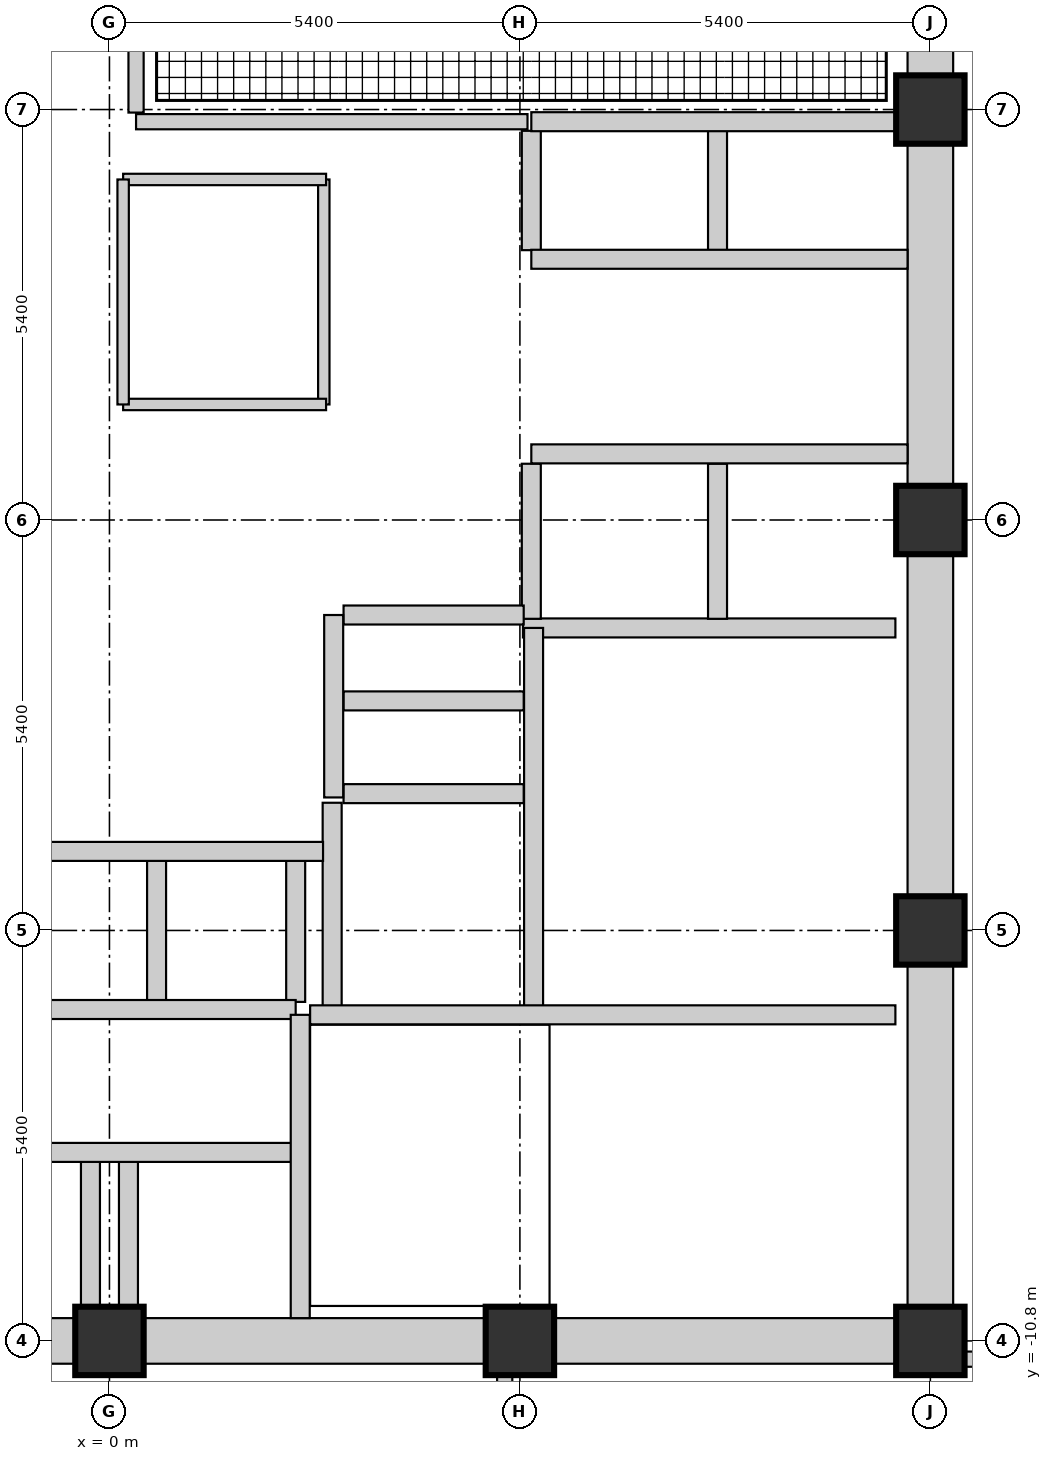
"""IFC4 building model, lengths in metres.
Left out: names, types, materials, properties, quantities, classifications, styles, units other than length and angle.
Written with IfcOpenShell. Run it as: python <this file> out.ifc"""

import sys

from ifc_helpers import new_model, si_unit, direction, frame, frame_2d, origin, origin_2d, place, context, subcontext, project, spatial, rectangle, extrude, element, fill, save


model = new_model("IFC4")
c1 = context("Model", 3, precision=1e-05, world=origin(), true_north=direction((0.0, 1.0)))
c2 = subcontext(c1, "Body", "Model", "MODEL_VIEW")
j1 = project(units=[si_unit("LENGTHUNIT", "METRE"), si_unit("PLANEANGLEUNIT", "RADIAN")], contexts=[c1])
p1 = place(None, origin())
s1 = spatial("IfcSite", under=j1, at=p1, CompositionType="ELEMENT")
p2 = place(p1, origin())
s2 = spatial("IfcBuilding", under=s1, at=p2, CompositionType="ELEMENT")
p3 = place(p2, frame((0.0, 0.0, 174.75)))
s3 = spatial("IfcBuildingStorey", under=s2, at=p3, CompositionType="ELEMENT", Elevation=174.75)
for number, where, z_axis, x_axis in (
    (1, (0.0, -10.8, 0.0), (0.0, 0.0, 1.0), (1.0, 0.0, 0.0)),
    (2, (5.4, -10.8, 0.0), (0.0, 0.0, 1.0), (1.0, 0.0, 0.0)),
    (3, (10.8, -10.8, 0.0), (0.0, 0.0, 1.0), (1.0, 0.0, 0.0)),
    (4, (10.8, -5.4, 0.0), (0.0, 0.0, 1.0), (1.0, 0.0, 0.0)),
    (5, (10.8, 0.0, 0.0), (0.0, 0.0, 1.0), (1.0, 0.0, 0.0)),
    (6, (10.8, 5.4, 0.0), (0.0, 0.0, 1.0), (1.0, 0.0, 0.0)),
):
    element("IfcColumn", number, at=place(p3, frame(where, z_axis=z_axis, x_axis=x_axis)), inside=s3, PredefinedType="COLUMN", context=c2, shape_type="SweptSolid", body=[
        extrude(rectangle(XDim=0.9, YDim=0.9, at=origin_2d()), origin(), (0.0, 0.0, 1.0), 3.75),
    ])
for number, where, z_axis, x_axis in (
    (7, (10.8, -10.34, 0.0), (0.0, 0.0, 1.0), (0.0, 1.0, 0.0)),
    (8, (-4.94, -10.8, 0.0), (0.0, 0.0, 1.0), (1.0, 0.0, 0.0)),
):
    element("IfcWall", number, at=place(p3, frame(where, z_axis=z_axis, x_axis=x_axis)), inside=s3, PredefinedType="SHEAR", context=c2, shape_type="SweptSolid", body=[
        extrude(rectangle(XDim=4.48, YDim=0.6, at=frame_2d((2.24, 0.0))), origin(), (0.0, 0.0, 1.0), 3.75),
    ])
p4 = place(p3, frame((10.8, -4.94, 0.0), z_axis=(0.0, 0.0, 1.0), x_axis=(0.0, 1.0, 0.0)))
e9 = element("IfcWall", 9, at=p4, inside=s3, PredefinedType="SHEAR", context=c2, shape_type="SweptSolid", body=[
    extrude(rectangle(XDim=4.48, YDim=0.6, at=frame_2d((2.24, 0.0))), origin(), (0.0, 0.0, 1.0), 3.75),
])
p5 = place(p4, frame((1.69, 0.0, 0.0)))
e10 = element("IfcOpeningElement", 10, at=p5, cuts=e9, PredefinedType="OPENING", context=c2, shape_type="SweptSolid", body=[
    extrude(rectangle(XDim=1.1, YDim=2.1, at=frame_2d((0.55, 1.05))), frame((0.0, 0.31, 0.0), z_axis=(0.0, -1.0, 0.0), x_axis=(1.0, 0.0, 0.0)), (0.0, 0.0, 1.0), 0.62),
])
p6 = place(p3, frame((0.46, -10.8, 0.0), z_axis=(0.0, 0.0, 1.0), x_axis=(1.0, 0.0, 0.0)))
e11 = element("IfcWall", 11, at=p6, inside=s3, PredefinedType="SHEAR", context=c2, shape_type="SweptSolid", body=[
    extrude(rectangle(XDim=4.48, YDim=0.6, at=frame_2d((2.24, 0.0))), origin(), (0.0, 0.0, 1.0), 3.75),
])
p7 = place(p3, frame((10.8, 0.46, 0.0), z_axis=(0.0, 0.0, 1.0), x_axis=(0.0, 1.0, 0.0)))
e12 = element("IfcWall", 12, at=p7, inside=s3, PredefinedType="SHEAR", context=c2, shape_type="SweptSolid", body=[
    extrude(rectangle(XDim=4.48, YDim=0.6, at=frame_2d((2.24, 0.0))), origin(), (0.0, 0.0, 1.0), 3.75),
])
p8 = place(p7, frame((1.69, 0.0, 0.0)))
e13 = element("IfcOpeningElement", 13, at=p8, cuts=e12, PredefinedType="OPENING", context=c2, shape_type="SweptSolid", body=[
    extrude(rectangle(XDim=1.1, YDim=2.1, at=frame_2d((0.55, 1.05))), frame((0.0, 0.31, 0.0), z_axis=(0.0, -1.0, 0.0), x_axis=(1.0, 0.0, 0.0)), (0.0, 0.0, 1.0), 0.62),
])
for number, where, z_axis, x_axis in (
    (14, (5.86, -10.8, 0.0), (0.0, 0.0, 1.0), (1.0, 0.0, 0.0)),
    (15, (10.8, 5.86, 0.0), (0.0, 0.0, 1.0), (0.0, 1.0, 0.0)),
):
    element("IfcWall", number, at=place(p3, frame(where, z_axis=z_axis, x_axis=x_axis)), inside=s3, PredefinedType="SHEAR", context=c2, shape_type="SweptSolid", body=[
        extrude(rectangle(XDim=4.48, YDim=0.6, at=frame_2d((2.24, 0.0))), origin(), (0.0, 0.0, 1.0), 3.75),
    ])
p9 = place(p3, frame((2.93, -6.51, 0.0), z_axis=(0.0, 0.0, 1.0), x_axis=(0.0, 1.0, 0.0)))
e16 = element("IfcWall", 16, at=p9, inside=s3, PredefinedType="SHEAR", context=c2, shape_type="SweptSolid", body=[
    extrude(rectangle(XDim=2.79, YDim=0.25, at=frame_2d((1.395, 0.0))), origin(), (0.0, 0.0, 1.0), 3.75),
])
p10 = place(p3, frame((5.44, -1.42, 0.0), z_axis=(0.0, 0.0, 1.0), x_axis=(1.0, 0.0, 0.0)))
e17 = element("IfcWall", 17, at=p10, inside=s3, PredefinedType="SHEAR", context=c2, shape_type="SweptSolid", body=[
    extrude(rectangle(XDim=4.9, YDim=0.25, at=frame_2d((2.45, 0.0))), origin(), (0.0, 0.0, 1.0), 3.75),
])
p11 = place(p3, frame((3.08, -3.6, 0.0), z_axis=(0.0, 0.0, 1.0), x_axis=(1.0, 0.0, 0.0)))
e18 = element("IfcWall", 18, at=p11, inside=s3, PredefinedType="SHEAR", context=c2, shape_type="SweptSolid", body=[
    extrude(rectangle(XDim=2.37, YDim=0.25, at=frame_2d((1.185, 0.0))), origin(), (0.0, 0.0, 1.0), 3.75),
])
p12 = place(p3, frame((5.58, -6.51, 0.0), z_axis=(0.0, 0.0, 1.0), x_axis=(0.0, 1.0, 0.0)))
e19 = element("IfcWall", 19, at=p12, inside=s3, PredefinedType="SHEAR", context=c2, shape_type="SweptSolid", body=[
    extrude(rectangle(XDim=5.09, YDim=0.25, at=frame_2d((2.545, 0.0))), origin(), (0.0, 0.0, 1.0), 3.75),
])
p13 = place(p12, frame((0.85, 0.0, 0.0)))
e20 = element("IfcOpeningElement", 20, at=p13, cuts=e19, PredefinedType="OPENING", context=c2, shape_type="SweptSolid", body=[
    extrude(rectangle(XDim=1.1, YDim=2.1, at=frame_2d((0.55, 1.05))), frame((0.0, 0.135, 0.0), z_axis=(0.0, -1.0, 0.0), x_axis=(1.0, 0.0, 0.0)), (0.0, 0.0, 1.0), 0.27),
])
for number, where, z_axis, x_axis in (
    (21, (0.62, -6.34, 0.0), (0.0, 0.0, 1.0), (0.0, 1.0, 0.0)),
    (22, (2.45, -6.34, 0.0), (0.0, 0.0, 1.0), (0.0, 1.0, 0.0)),
):
    element("IfcWall", number, at=place(p3, frame(where, z_axis=z_axis, x_axis=x_axis)), inside=s3, PredefinedType="SHEAR", context=c2, shape_type="SweptSolid", body=[
        extrude(rectangle(XDim=1.88, YDim=0.25, at=frame_2d((0.94, 0.0))), origin(), (0.0, 0.0, 1.0), 3.75),
    ])
for number, where, z_axis, x_axis in (
    (23, (-0.25, -10.35, 0.0), (0.0, 0.0, 1.0), (0.0, 1.0, 0.0)),
    (24, (0.25, -10.35, 0.0), (0.0, 0.0, 1.0), (0.0, 1.0, 0.0)),
):
    element("IfcWall", number, at=place(p3, frame(where, z_axis=z_axis, x_axis=x_axis)), inside=s3, PredefinedType="SHEAR", context=c2, shape_type="SweptSolid", body=[
        extrude(rectangle(XDim=1.91, YDim=0.25, at=frame_2d((0.955, 0.0))), origin(), (0.0, 0.0, 1.0), 3.75),
    ])
p14 = place(p3, frame((-1.22, -6.44, 0.0), z_axis=(0.0, 0.0, 1.0), x_axis=(1.0, 0.0, 0.0)))
e25 = element("IfcWall", 25, at=p14, inside=s3, PredefinedType="SHEAR", context=c2, shape_type="SweptSolid", body=[
    extrude(rectangle(XDim=3.67, YDim=0.25, at=frame_2d((1.835, 0.0))), origin(), (0.0, 0.0, 1.0), 3.75),
])
p15 = place(p3, frame((-2.48, -8.32, 0.0), z_axis=(0.0, 0.0, 1.0), x_axis=(1.0, 0.0, 0.0)))
e26 = element("IfcWall", 26, at=p15, inside=s3, PredefinedType="SHEAR", context=c2, shape_type="SweptSolid", body=[
    extrude(rectangle(XDim=4.93, YDim=0.25, at=frame_2d((2.465, 0.0))), origin(), (0.0, 0.0, 1.0), 3.75),
])
p16 = place(p3, frame((-1.22, -4.36, 0.0), z_axis=(0.0, 0.0, 1.0), x_axis=(1.0, 0.0, 0.0)))
e27 = element("IfcWall", 27, at=p16, inside=s3, PredefinedType="SHEAR", context=c2, shape_type="SweptSolid", body=[
    extrude(rectangle(XDim=4.03, YDim=0.25, at=frame_2d((2.015, 0.0))), origin(), (0.0, 0.0, 1.0), 3.75),
])
for number, where, z_axis, x_axis in (
    (28, (5.55, 3.55, 0.0), (0.0, 0.0, 1.0), (0.0, 1.0, 0.0)),
    (29, (8.0, 3.55, 0.0), (0.0, 0.0, 1.0), (0.0, 1.0, 0.0)),
):
    element("IfcWall", number, at=place(p3, frame(where, z_axis=z_axis, x_axis=x_axis)), inside=s3, PredefinedType="SHEAR", context=c2, shape_type="SweptSolid", body=[
        extrude(rectangle(XDim=1.57, YDim=0.25, at=frame_2d((0.785, 0.0))), origin(), (0.0, 0.0, 1.0), 3.75),
    ])
for number, where, z_axis, x_axis in (
    (30, (5.55, -1.3, 0.0), (0.0, 0.0, 1.0), (0.0, 1.0, 0.0)),
    (31, (8.0, -1.3, 0.0), (0.0, 0.0, 1.0), (0.0, 1.0, 0.0)),
):
    element("IfcWall", number, at=place(p3, frame(where, z_axis=z_axis, x_axis=x_axis)), inside=s3, PredefinedType="SHEAR", context=c2, shape_type="SweptSolid", body=[
        extrude(rectangle(XDim=2.04, YDim=0.25, at=frame_2d((1.02, 0.0))), origin(), (0.0, 0.0, 1.0), 3.75),
    ])
p17 = place(p3, frame((5.55, 3.43, 0.0), z_axis=(0.0, 0.0, 1.0), x_axis=(1.0, 0.0, 0.0)))
e32 = element("IfcWall", 32, at=p17, inside=s3, PredefinedType="SHEAR", context=c2, shape_type="SweptSolid", body=[
    extrude(rectangle(XDim=4.95, YDim=0.25, at=frame_2d((2.475, 0.0))), origin(), (0.0, 0.0, 1.0), 3.75),
])
p18 = place(p17, frame((0.65, 0.0, 0.0)))
e33 = element("IfcOpeningElement", 33, at=p18, cuts=e32, PredefinedType="OPENING", context=c2, shape_type="SweptSolid", body=[
    extrude(rectangle(XDim=1.1, YDim=2.1, at=frame_2d((0.55, 1.05))), frame((0.0, 0.135, 0.0), z_axis=(0.0, -1.0, 0.0), x_axis=(1.0, 0.0, 0.0)), (0.0, 0.0, 1.0), 0.27),
])
p19 = place(p17, frame((3.05, 0.0, 0.0)))
e34 = element("IfcOpeningElement", 34, at=p19, cuts=e32, PredefinedType="OPENING", context=c2, shape_type="SweptSolid", body=[
    extrude(rectangle(XDim=1.1, YDim=2.1, at=frame_2d((0.55, 1.05))), frame((0.0, 0.135, 0.0), z_axis=(0.0, -1.0, 0.0), x_axis=(1.0, 0.0, 0.0)), (0.0, 0.0, 1.0), 0.27),
])
p20 = place(p3, frame((5.55, 5.24, 0.0), z_axis=(0.0, 0.0, 1.0), x_axis=(1.0, 0.0, 0.0)))
e35 = element("IfcWall", 35, at=p20, inside=s3, PredefinedType="SHEAR", context=c2, shape_type="SweptSolid", body=[
    extrude(rectangle(XDim=4.8, YDim=0.25, at=frame_2d((2.4, 0.0))), origin(), (0.0, 0.0, 1.0), 3.75),
])
p21 = place(p3, frame((5.55, 0.87, 0.0), z_axis=(0.0, 0.0, 1.0), x_axis=(1.0, 0.0, 0.0)))
e36 = element("IfcWall", 36, at=p21, inside=s3, PredefinedType="SHEAR", context=c2, shape_type="SweptSolid", body=[
    extrude(rectangle(XDim=4.95, YDim=0.25, at=frame_2d((2.475, 0.0))), origin(), (0.0, 0.0, 1.0), 3.75),
])
p22 = place(p21, frame((0.65, 0.0, 0.0)))
e37 = element("IfcOpeningElement", 37, at=p22, cuts=e36, PredefinedType="OPENING", context=c2, shape_type="SweptSolid", body=[
    extrude(rectangle(XDim=1.1, YDim=2.1, at=frame_2d((0.55, 1.05))), frame((0.0, 0.135, 0.0), z_axis=(0.0, -1.0, 0.0), x_axis=(1.0, 0.0, 0.0)), (0.0, 0.0, 1.0), 0.27),
])
p23 = place(p21, frame((3.05, 0.0, 0.0)))
e38 = element("IfcOpeningElement", 38, at=p23, cuts=e36, PredefinedType="OPENING", context=c2, shape_type="SweptSolid", body=[
    extrude(rectangle(XDim=1.1, YDim=2.1, at=frame_2d((0.55, 1.05))), frame((0.0, 0.135, 0.0), z_axis=(0.0, -1.0, 0.0), x_axis=(1.0, 0.0, 0.0)), (0.0, 0.0, 1.0), 0.27),
])
for number, where, z_axis, x_axis in (
    (39, (3.08, -2.38, 0.0), (0.0, 0.0, 1.0), (1.0, 0.0, 0.0)),
    (40, (3.08, -1.25, 0.0), (0.0, 0.0, 1.0), (1.0, 0.0, 0.0)),
):
    element("IfcWall", number, at=place(p3, frame(where, z_axis=z_axis, x_axis=x_axis)), inside=s3, PredefinedType="SHEAR", context=c2, shape_type="SweptSolid", body=[
        extrude(rectangle(XDim=2.37, YDim=0.25, at=frame_2d((1.185, 0.0))), origin(), (0.0, 0.0, 1.0), 3.75),
    ])
p24 = place(p3, frame((2.95, -3.65, 0.0), z_axis=(0.0, 0.0, 1.0), x_axis=(0.0, 1.0, 0.0)))
e41 = element("IfcWall", 41, at=p24, inside=s3, PredefinedType="SHEAR", context=c2, shape_type="SweptSolid", body=[
    extrude(rectangle(XDim=2.4, YDim=0.25, at=frame_2d((1.2, 0.0))), origin(), (0.0, 0.0, 1.0), 3.75),
])
p25 = place(p24, frame((0.775, 0.0, 0.0)))
e42 = element("IfcOpeningElement", 42, at=p25, cuts=e41, PredefinedType="OPENING", context=c2, shape_type="SweptSolid", body=[
    extrude(rectangle(XDim=0.85, YDim=2.1, at=frame_2d((0.425, 1.05))), frame((0.0, 0.135, 0.0), z_axis=(0.0, -1.0, 0.0), x_axis=(1.0, 0.0, 0.0)), (0.0, 0.0, 1.0), 0.27),
])
p26 = place(p3, frame((2.64, -6.51, 0.0), z_axis=(0.0, 0.0, 1.0), x_axis=(1.0, 0.0, 0.0)))
e43 = element("IfcWall", 43, at=p26, inside=s3, PredefinedType="SHEAR", context=c2, shape_type="SweptSolid", body=[
    extrude(rectangle(XDim=7.7, YDim=0.25, at=frame_2d((3.85, 0.0))), origin(), (0.0, 0.0, 1.0), 3.75),
])
p27 = place(p26, frame((6.0, 0.0, 0.0)))
e44 = element("IfcOpeningElement", 44, at=p27, cuts=e43, PredefinedType="OPENING", context=c2, shape_type="SweptSolid", body=[
    extrude(rectangle(XDim=0.95, YDim=2.1, at=frame_2d((0.475, 1.05))), frame((0.0, 0.135, 0.0), z_axis=(0.0, -1.0, 0.0), x_axis=(1.0, 0.0, 0.0)), (0.0, 0.0, 1.0), 0.27),
])
p28 = place(p3, frame((2.51, -10.5, 0.0), z_axis=(0.0, 0.0, 1.0), x_axis=(0.0, 1.0, 0.0)))
e45 = element("IfcWall", 45, at=p28, inside=s3, PredefinedType="SHEAR", context=c2, shape_type="SweptSolid", body=[
    extrude(rectangle(XDim=3.99, YDim=0.25, at=frame_2d((1.995, 0.0))), origin(), (0.0, 0.0, 1.0), 3.75),
])
p29 = place(p3, frame((2.82, 1.52, 0.0), z_axis=(0.0, 0.0, 1.0), x_axis=(0.0, 1.0, 0.0)))
e46 = element("IfcWall", 46, at=p29, inside=s3, PredefinedType="PARTITIONING", context=c2, shape_type="SweptSolid", body=[
    extrude(rectangle(XDim=2.96, YDim=0.15, at=frame_2d((1.48, 0.0))), origin(), (0.0, 0.0, 1.0), 3.57),
])
for number, where, z_axis, x_axis in (
    (47, (0.18, 4.48, 0.0), (0.0, 0.0, 1.0), (1.0, 0.0, 0.0)),
    (48, (0.18, 1.52, 0.0), (0.0, 0.0, 1.0), (1.0, 0.0, 0.0)),
):
    element("IfcWall", number, at=place(p3, frame(where, z_axis=z_axis, x_axis=x_axis)), inside=s3, PredefinedType="PARTITIONING", context=c2, shape_type="SweptSolid", body=[
        extrude(rectangle(XDim=2.67, YDim=0.15, at=frame_2d((1.335, 0.0))), origin(), (0.0, 0.0, 1.0), 3.57),
    ])
p30 = place(p3, frame((0.18, 1.52, 0.0), z_axis=(0.0, 0.0, 1.0), x_axis=(0.0, 1.0, 0.0)))
e49 = element("IfcWall", 49, at=p30, inside=s3, PredefinedType="PARTITIONING", context=c2, shape_type="SweptSolid", body=[
    extrude(rectangle(XDim=2.96, YDim=0.15, at=frame_2d((1.48, 0.0))), origin(), (0.0, 0.0, 1.0), 3.57),
])
p31 = place(p30, frame((0.95, 0.0, 0.0)))
e50 = element("IfcOpeningElement", 50, at=p31, cuts=e49, PredefinedType="OPENING", context=c2, shape_type="SweptSolid", body=[
    extrude(rectangle(XDim=0.85, YDim=2.1, at=frame_2d((0.425, 1.05))), frame((0.0, 0.085, 0.0), z_axis=(0.0, -1.0, 0.0), x_axis=(1.0, 0.0, 0.0)), (0.0, 0.0, 1.0), 0.17),
])
p32 = place(p3, frame((0.35, 5.24, 0.0), z_axis=(0.0, 0.0, 1.0), x_axis=(1.0, 0.0, 0.0)))
e51 = element("IfcWall", 51, at=p32, inside=s3, PredefinedType="PARTITIONING", context=c2, shape_type="SweptSolid", body=[
    extrude(rectangle(XDim=5.15, YDim=0.2, at=frame_2d((2.575, 0.0))), origin(), (0.0, 0.0, 1.0), 3.57),
])
p33 = place(p32, frame((0.8, 0.0, 0.0)))
e52 = element("IfcOpeningElement", 52, at=p33, cuts=e51, PredefinedType="OPENING", context=c2, shape_type="SweptSolid", body=[
    extrude(rectangle(XDim=1.1, YDim=2.1, at=frame_2d((0.55, 1.05))), frame((0.0, 0.11, 0.0), z_axis=(0.0, -1.0, 0.0), x_axis=(1.0, 0.0, 0.0)), (0.0, 0.0, 1.0), 0.22),
])
p34 = place(p3, frame((0.35, 5.36, 0.0), z_axis=(0.0, 0.0, 1.0), x_axis=(0.0, 1.0, 0.0)))
e53 = element("IfcWall", 53, at=p34, inside=s3, PredefinedType="PARTITIONING", context=c2, shape_type="SweptSolid", body=[
    extrude(rectangle(XDim=4.98, YDim=0.2, at=frame_2d((2.49, 0.0))), origin(), (0.0, 0.0, 1.0), 3.57),
])
for number, where, z_axis, x_axis in (
    (54, (11.04, -11.04, 0.0), (0.0, 0.0, 1.0), (1.0, 0.0, 0.0)),
    (55, (5.2, -12.9, 0.0), (0.0, 0.0, 1.0), (0.0, 1.0, 0.0)),
):
    element("IfcWall", number, at=place(p3, frame(where, z_axis=z_axis, x_axis=x_axis)), inside=s3, PredefinedType="PARTITIONING", context=c2, shape_type="SweptSolid", body=[
        extrude(rectangle(XDim=1.86, YDim=0.2, at=frame_2d((0.93, 0.0))), origin(), (0.0, 0.0, 1.0), 3.006),
    ])
p35 = place(p31, origin())
e56 = element("IfcDoor", 56, at=p35, inside=s3, OperationType="SINGLE_SWING_RIGHT", PredefinedType="DOOR", context=c2, shape_type="SweptSolid", body=[
    extrude(rectangle(XDim=0.85, YDim=2.1, at=frame_2d((0.425, 1.05))), frame((0.0, 0.025, 0.0), z_axis=(0.0, -1.0, 0.0), x_axis=(1.0, 0.0, 0.0)), (0.0, 0.0, 1.0), 0.05),
])
fill(e50, e56)
p36 = place(p27, origin())
e57 = element("IfcDoor", 57, at=p36, inside=s3, OperationType="SINGLE_SWING_RIGHT", PredefinedType="DOOR", context=c2, shape_type="SweptSolid", body=[
    extrude(rectangle(XDim=0.95, YDim=2.1, at=frame_2d((0.475, 1.05))), frame((0.0, 0.025, 0.0), z_axis=(0.0, -1.0, 0.0), x_axis=(1.0, 0.0, 0.0)), (0.0, 0.0, 1.0), 0.05),
])
fill(e44, e57)
p37 = place(p25, origin())
e58 = element("IfcDoor", 58, at=p37, inside=s3, OperationType="SINGLE_SWING_LEFT", PredefinedType="DOOR", context=c2, shape_type="SweptSolid", body=[
    extrude(rectangle(XDim=0.85, YDim=2.1, at=frame_2d((0.425, 1.05))), frame((0.0, 0.025, 0.0), z_axis=(0.0, -1.0, 0.0), x_axis=(1.0, 0.0, 0.0)), (0.0, 0.0, 1.0), 0.05),
])
fill(e42, e58)
p38 = place(p5, origin())
e59 = element("IfcDoor", 59, at=p38, inside=s3, OperationType="SINGLE_SWING_RIGHT", PredefinedType="DOOR", context=c2, shape_type="SweptSolid", body=[
    extrude(rectangle(XDim=1.1, YDim=2.1, at=frame_2d((0.55, 1.05))), frame((0.0, 0.025, 0.0), z_axis=(0.0, -1.0, 0.0), x_axis=(1.0, 0.0, 0.0)), (0.0, 0.0, 1.0), 0.05),
])
fill(e10, e59)
p39 = place(p13, origin())
e60 = element("IfcDoor", 60, at=p39, inside=s3, OperationType="SLIDING_TO_RIGHT", PredefinedType="DOOR", context=c2, shape_type="SweptSolid", body=[
    extrude(rectangle(XDim=1.1, YDim=2.1, at=frame_2d((0.55, 1.05))), frame((0.0, 0.025, 0.0), z_axis=(0.0, -1.0, 0.0), x_axis=(1.0, 0.0, 0.0)), (0.0, 0.0, 1.0), 0.05),
])
fill(e20, e60)
p40 = place(p33, origin())
e61 = element("IfcDoor", 61, at=p40, inside=s3, OperationType="SINGLE_SWING_LEFT", PredefinedType="DOOR", context=c2, shape_type="SweptSolid", body=[
    extrude(rectangle(XDim=1.1, YDim=2.1, at=frame_2d((0.55, 1.05))), frame((0.0, 0.025, 0.0), z_axis=(0.0, -1.0, 0.0), x_axis=(1.0, 0.0, 0.0)), (0.0, 0.0, 1.0), 0.05),
])
fill(e52, e61)
p41 = place(p18, origin())
e62 = element("IfcDoor", 62, at=p41, inside=s3, OperationType="SLIDING_TO_RIGHT", PredefinedType="DOOR", context=c2, shape_type="SweptSolid", body=[
    extrude(rectangle(XDim=1.1, YDim=2.1, at=frame_2d((0.55, 1.05))), frame((0.0, 0.025, 0.0), z_axis=(0.0, -1.0, 0.0), x_axis=(1.0, 0.0, 0.0)), (0.0, 0.0, 1.0), 0.05),
])
fill(e33, e62)
p42 = place(p19, origin())
e63 = element("IfcDoor", 63, at=p42, inside=s3, OperationType="SLIDING_TO_RIGHT", PredefinedType="DOOR", context=c2, shape_type="SweptSolid", body=[
    extrude(rectangle(XDim=1.1, YDim=2.1, at=frame_2d((0.55, 1.05))), frame((0.0, 0.025, 0.0), z_axis=(0.0, -1.0, 0.0), x_axis=(1.0, 0.0, 0.0)), (0.0, 0.0, 1.0), 0.05),
])
fill(e34, e63)
p43 = place(p22, origin())
e64 = element("IfcDoor", 64, at=p43, inside=s3, OperationType="SLIDING_TO_RIGHT", PredefinedType="DOOR", context=c2, shape_type="SweptSolid", body=[
    extrude(rectangle(XDim=1.1, YDim=2.1, at=frame_2d((0.55, 1.05))), frame((0.0, 0.025, 0.0), z_axis=(0.0, -1.0, 0.0), x_axis=(1.0, 0.0, 0.0)), (0.0, 0.0, 1.0), 0.05),
])
fill(e37, e64)
p44 = place(p23, origin())
e65 = element("IfcDoor", 65, at=p44, inside=s3, OperationType="SLIDING_TO_RIGHT", PredefinedType="DOOR", context=c2, shape_type="SweptSolid", body=[
    extrude(rectangle(XDim=1.1, YDim=2.1, at=frame_2d((0.55, 1.05))), frame((0.0, 0.025, 0.0), z_axis=(0.0, -1.0, 0.0), x_axis=(1.0, 0.0, 0.0)), (0.0, 0.0, 1.0), 0.05),
])
fill(e38, e65)
p45 = place(p8, origin())
e66 = element("IfcDoor", 66, at=p45, inside=s3, OperationType="SINGLE_SWING_LEFT", PredefinedType="DOOR", context=c2, shape_type="SweptSolid", body=[
    extrude(rectangle(XDim=1.1, YDim=2.1, at=frame_2d((0.55, 1.05))), frame((0.0, 0.025, 0.0), z_axis=(0.0, -1.0, 0.0), x_axis=(1.0, 0.0, 0.0)), (0.0, 0.0, 1.0), 0.05),
])
fill(e13, e66)
save(model, sys.argv[1])
